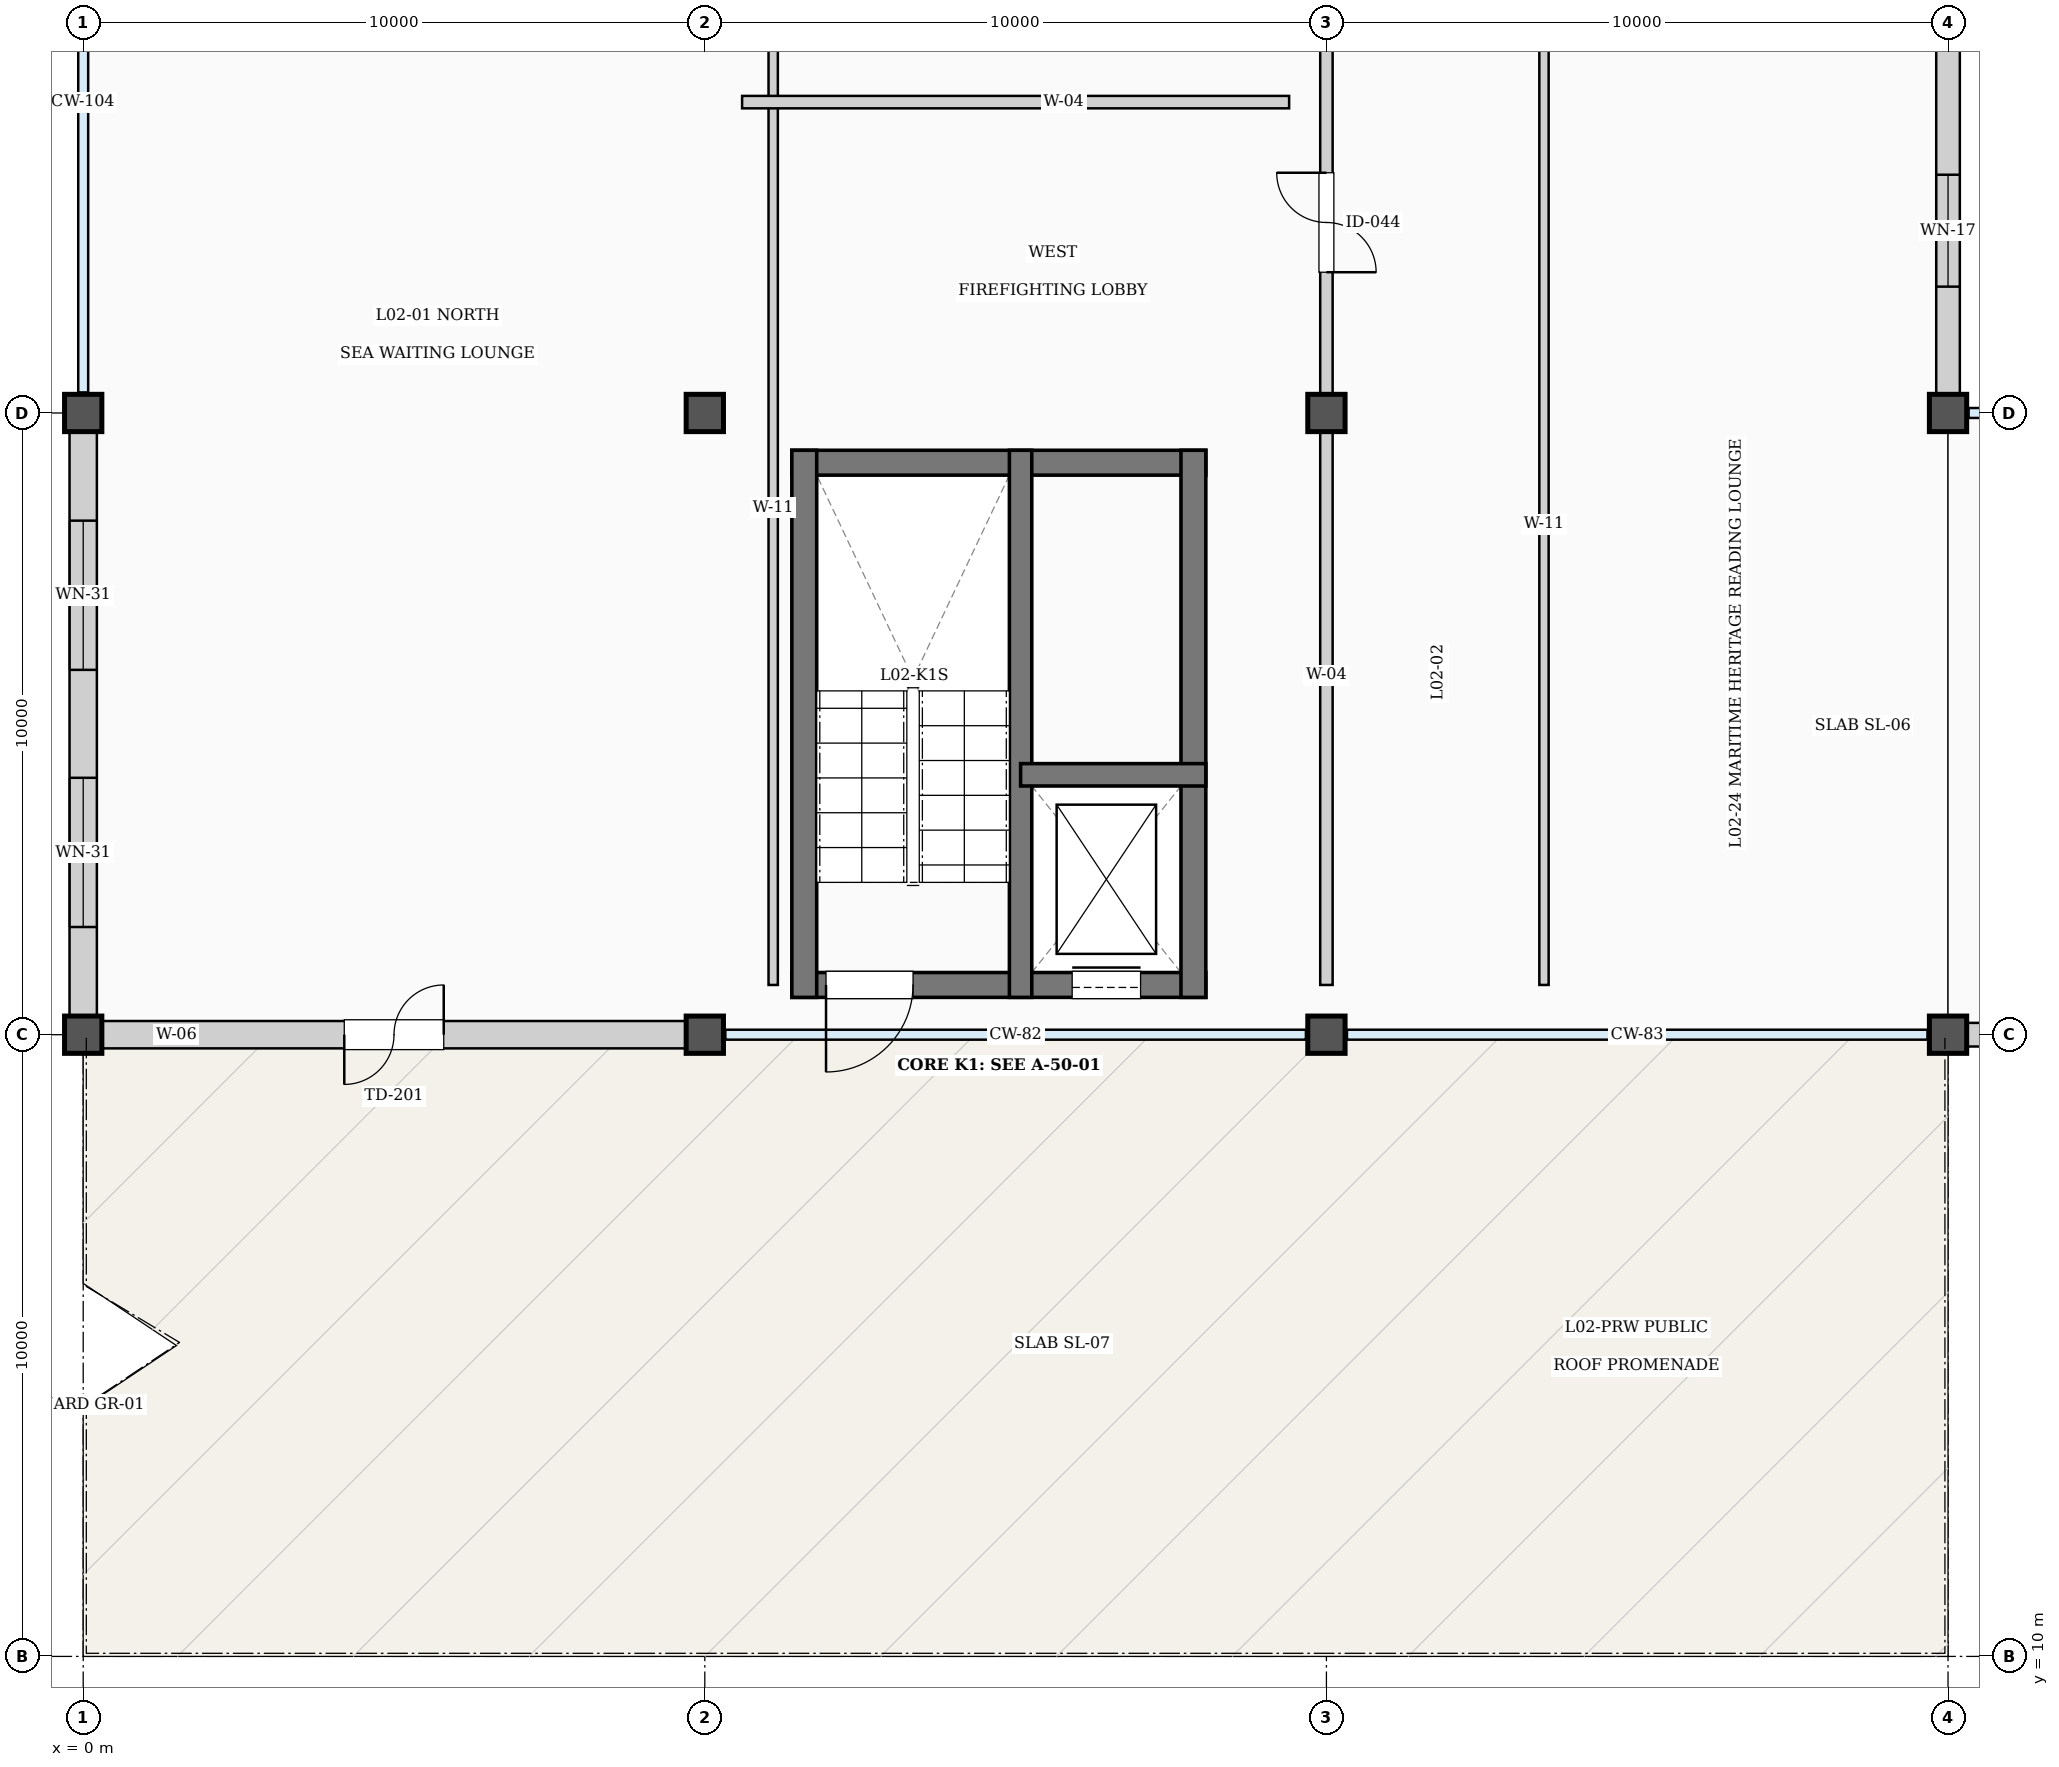
"""IFC4 building model, lengths in metres.
Left out: names, types, materials, properties, quantities, classifications, styles, units other than length and angle.
Written with IfcOpenShell. Run it as: python <this file> out.ifc"""

import sys

from ifc_helpers import new_model, si_unit, direction, frame, frame_2d, origin, origin_2d, place, context, subcontext, project, spatial, rectangle, extrude, element, fill, save


model = new_model("IFC4")
c1 = context("Model", 3, precision=1e-05, world=origin(), true_north=direction((0.0, 1.0)))
c2 = subcontext(c1, "Body", "Model", "MODEL_VIEW")
j1 = project(units=[si_unit("LENGTHUNIT", "METRE"), si_unit("PLANEANGLEUNIT", "RADIAN")], contexts=[c1])
p1 = place(None, origin())
s1 = spatial("IfcSite", under=j1, at=p1, CompositionType="ELEMENT")
p2 = place(p1, origin())
s2 = spatial("IfcBuilding", under=s1, at=p2, CompositionType="ELEMENT")
p3 = place(p2, frame((0.0, 0.0, 10.2)))
s3 = spatial("IfcBuildingStorey", under=s2, at=p3, CompositionType="ELEMENT", Elevation=10.2)
for number, where, z_axis, x_axis in (
    (1, (0.0, 20.0, 0.0), (0.0, 0.0, 1.0), (1.0, 0.0, 0.0)),
    (2, (0.0, 30.0, 0.0), (0.0, 0.0, 1.0), (1.0, 0.0, 0.0)),
    (3, (10.0, 20.0, 0.0), (0.0, 0.0, 1.0), (1.0, 0.0, 0.0)),
    (4, (10.0, 30.0, 0.0), (0.0, 0.0, 1.0), (1.0, 0.0, 0.0)),
    (5, (20.0, 20.0, 0.0), (0.0, 0.0, 1.0), (1.0, 0.0, 0.0)),
    (6, (20.0, 30.0, 0.0), (0.0, 0.0, 1.0), (1.0, 0.0, 0.0)),
    (7, (30.0, 20.0, 0.0), (0.0, 0.0, 1.0), (1.0, 0.0, 0.0)),
    (8, (30.0, 30.0, 0.0), (0.0, 0.0, 1.0), (1.0, 0.0, 0.0)),
):
    element("IfcColumn", number, at=place(p3, frame(where, z_axis=z_axis, x_axis=x_axis)), inside=s3, PredefinedType="COLUMN", context=c2, shape_type="SweptSolid", body=[
        extrude(rectangle(XDim=0.6, YDim=0.6, at=origin_2d()), origin(), (0.0, 0.0, 1.0), 4.2),
    ])
p4 = place(p3, frame((0.3, 20.0, 0.0), z_axis=(0.0, 0.0, 1.0), x_axis=(1.0, 0.0, 0.0)))
e9 = element("IfcWall", 9, at=p4, inside=s3, PredefinedType="SOLIDWALL", context=c2, shape_type="SweptSolid", body=[
    extrude(rectangle(XDim=9.4, YDim=0.44, at=frame_2d((4.7, 0.0))), origin(), (0.0, 0.0, 1.0), 3.62),
])
p5 = place(p4, frame((3.9, 0.0, 0.0)))
e10 = element("IfcOpeningElement", 10, at=p5, cuts=e9, PredefinedType="OPENING", context=c2, shape_type="SweptSolid", body=[
    extrude(rectangle(XDim=1.6, YDim=2.35, at=frame_2d((0.8, 1.175))), frame((0.0, 0.23, 0.0), z_axis=(0.0, -1.0, 0.0), x_axis=(1.0, 0.0, 0.0)), (0.0, 0.0, 1.0), 0.46),
])
p6 = place(p3, frame((30.3, 20.0, 0.0), z_axis=(0.0, 0.0, 1.0), x_axis=(1.0, 0.0, 0.0)))
e11 = element("IfcWall", 11, at=p6, inside=s3, PredefinedType="SOLIDWALL", context=c2, shape_type="SweptSolid", body=[
    extrude(rectangle(XDim=9.475, YDim=0.38, at=frame_2d((4.737, 0.0))), origin(), (0.0, 0.0, 1.0), 3.63),
])
p7 = place(p6, frame((1.753, 0.0, 0.9)))
e12 = element("IfcOpeningElement", 12, at=p7, cuts=e11, PredefinedType="OPENING", context=c2, shape_type="SweptSolid", body=[
    extrude(rectangle(XDim=1.8, YDim=2.1, at=frame_2d((0.9, 1.05))), frame((0.0, 0.2, 0.0), z_axis=(0.0, -1.0, 0.0), x_axis=(1.0, 0.0, 0.0)), (0.0, 0.0, 1.0), 0.4),
])
p8 = place(p6, frame((5.922, 0.0, 0.9)))
e13 = element("IfcOpeningElement", 13, at=p8, cuts=e11, PredefinedType="OPENING", context=c2, shape_type="SweptSolid", body=[
    extrude(rectangle(XDim=1.8, YDim=2.1, at=frame_2d((0.9, 1.05))), frame((0.0, 0.2, 0.0), z_axis=(0.0, -1.0, 0.0), x_axis=(1.0, 0.0, 0.0)), (0.0, 0.0, 1.0), 0.4),
])
p9 = place(p3, frame((0.0, 20.3, 0.0), z_axis=(0.0, 0.0, 1.0), x_axis=(0.0, 1.0, 0.0)))
e14 = element("IfcWall", 14, at=p9, inside=s3, PredefinedType="SOLIDWALL", context=c2, shape_type="SweptSolid", body=[
    extrude(rectangle(XDim=9.4, YDim=0.44, at=frame_2d((4.7, 0.0))), origin(), (0.0, 0.0, 1.0), 3.67),
])
p10 = place(p9, frame((1.432, 0.0, 0.9)))
e15 = element("IfcOpeningElement", 15, at=p10, cuts=e14, PredefinedType="OPENING", context=c2, shape_type="SweptSolid", body=[
    extrude(rectangle(XDim=2.4, YDim=2.1, at=frame_2d((1.2, 1.05))), frame((0.0, 0.23, 0.0), z_axis=(0.0, -1.0, 0.0), x_axis=(1.0, 0.0, 0.0)), (0.0, 0.0, 1.0), 0.46),
])
p11 = place(p9, frame((5.568, 0.0, 0.9)))
e16 = element("IfcOpeningElement", 16, at=p11, cuts=e14, PredefinedType="OPENING", context=c2, shape_type="SweptSolid", body=[
    extrude(rectangle(XDim=2.4, YDim=2.1, at=frame_2d((1.2, 1.05))), frame((0.0, 0.23, 0.0), z_axis=(0.0, -1.0, 0.0), x_axis=(1.0, 0.0, 0.0)), (0.0, 0.0, 1.0), 0.46),
])
p12 = place(p3, frame((30.0, 39.7, 0.0), z_axis=(0.0, 0.0, 1.0), x_axis=(0.0, -1.0, 0.0)))
e17 = element("IfcWall", 17, at=p12, inside=s3, PredefinedType="SOLIDWALL", context=c2, shape_type="SweptSolid", body=[
    extrude(rectangle(XDim=9.4, YDim=0.38, at=frame_2d((4.7, 0.0))), origin(), (0.0, 0.0, 1.0), 3.27),
])
p13 = place(p12, frame((1.732, 0.0, 0.9)))
e18 = element("IfcOpeningElement", 18, at=p13, cuts=e17, PredefinedType="OPENING", context=c2, shape_type="SweptSolid", body=[
    extrude(rectangle(XDim=1.8, YDim=1.5, at=frame_2d((0.9, 0.75))), frame((0.0, 0.2, 0.0), z_axis=(0.0, -1.0, 0.0), x_axis=(1.0, 0.0, 0.0)), (0.0, 0.0, 1.0), 0.4),
])
p14 = place(p12, frame((5.868, 0.0, 0.9)))
e19 = element("IfcOpeningElement", 19, at=p14, cuts=e17, PredefinedType="OPENING", context=c2, shape_type="SweptSolid", body=[
    extrude(rectangle(XDim=1.8, YDim=1.5, at=frame_2d((0.9, 0.75))), frame((0.0, 0.2, 0.0), z_axis=(0.0, -1.0, 0.0), x_axis=(1.0, 0.0, 0.0)), (0.0, 0.0, 1.0), 0.4),
])
p15 = place(p3, frame((11.4, 20.8, 0.0), z_axis=(0.0, 0.0, 1.0), x_axis=(1.0, 0.0, 0.0)))
e20 = element("IfcWall", 20, at=p15, inside=s3, PredefinedType="SHEAR", context=c2, shape_type="SweptSolid", body=[
    extrude(rectangle(XDim=6.66, YDim=0.4, at=frame_2d((3.33, 0.0))), origin(), (0.0, 0.0, 1.0), 4.2),
])
p16 = place(p15, frame((0.55, 0.0, 0.0)))
e21 = element("IfcOpeningElement", 21, at=p16, cuts=e20, PredefinedType="OPENING", context=c2, shape_type="SweptSolid", body=[
    extrude(rectangle(XDim=1.4, YDim=2.35, at=frame_2d((0.7, 1.175))), frame((0.0, 0.21, 0.0), z_axis=(0.0, -1.0, 0.0), x_axis=(1.0, 0.0, 0.0)), (0.0, 0.0, 1.0), 0.42),
])
p17 = place(p15, frame((4.51, 0.0, 0.0)))
e22 = element("IfcOpeningElement", 22, at=p17, cuts=e20, PredefinedType="OPENING", context=c2, shape_type="SweptSolid", body=[
    extrude(rectangle(XDim=1.1, YDim=2.3, at=frame_2d((0.55, 1.15))), frame((0.0, 0.21, 0.0), z_axis=(0.0, -1.0, 0.0), x_axis=(1.0, 0.0, 0.0)), (0.0, 0.0, 1.0), 0.42),
])
p18 = place(p3, frame((11.4, 29.2, 0.0), z_axis=(0.0, 0.0, 1.0), x_axis=(1.0, 0.0, 0.0)))
e23 = element("IfcWall", 23, at=p18, inside=s3, PredefinedType="SHEAR", context=c2, shape_type="SweptSolid", body=[
    extrude(rectangle(XDim=6.66, YDim=0.4, at=frame_2d((3.33, 0.0))), origin(), (0.0, 0.0, 1.0), 4.2),
])
for number, where, z_axis, x_axis in (
    (24, (11.6, 20.6, 0.0), (0.0, 0.0, 1.0), (0.0, 1.0, 0.0)),
    (25, (17.86, 20.6, 0.0), (0.0, 0.0, 1.0), (0.0, 1.0, 0.0)),
):
    element("IfcWall", number, at=place(p3, frame(where, z_axis=z_axis, x_axis=x_axis)), inside=s3, PredefinedType="SHEAR", context=c2, shape_type="SweptSolid", body=[
        extrude(rectangle(XDim=8.8, YDim=0.4, at=frame_2d((4.4, 0.0))), origin(), (0.0, 0.0, 1.0), 4.2),
    ])
p19 = place(p3, frame((15.08, 20.6, 0.0), z_axis=(0.0, 0.0, 1.0), x_axis=(0.0, 1.0, 0.0)))
e26 = element("IfcWall", 26, at=p19, inside=s3, PredefinedType="SHEAR", context=c2, shape_type="SweptSolid", body=[
    extrude(rectangle(XDim=8.8, YDim=0.36, at=frame_2d((4.4, 0.0))), origin(), (0.0, 0.0, 1.0), 4.2),
])
p20 = place(p3, frame((15.08, 24.18, 0.0), z_axis=(0.0, 0.0, 1.0), x_axis=(1.0, 0.0, 0.0)))
e27 = element("IfcWall", 27, at=p20, inside=s3, PredefinedType="SHEAR", context=c2, shape_type="SweptSolid", body=[
    extrude(rectangle(XDim=2.98, YDim=0.36, at=frame_2d((1.49, 0.0))), origin(), (0.0, 0.0, 1.0), 4.2),
])
p21 = place(p3, frame((20.0, 20.8, 0.0), z_axis=(0.0, 0.0, 1.0), x_axis=(0.0, 1.0, 0.0)))
e28 = element("IfcWall", 28, at=p21, inside=s3, PredefinedType="PARTITIONING", context=c2, shape_type="SweptSolid", body=[
    extrude(rectangle(XDim=58.4, YDim=0.2, at=frame_2d((29.2, 0.0))), origin(), (0.0, 0.0, 1.0), 3.63),
])
p22 = place(p21, frame((11.464, 0.0, 0.0)))
e29 = element("IfcOpeningElement", 29, at=p22, cuts=e28, PredefinedType="OPENING", context=c2, shape_type="SweptSolid", body=[
    extrude(rectangle(XDim=1.6, YDim=2.4, at=frame_2d((0.8, 1.2))), frame((0.0, 0.11, 0.0), z_axis=(0.0, -1.0, 0.0), x_axis=(1.0, 0.0, 0.0)), (0.0, 0.0, 1.0), 0.22),
])
p23 = place(p21, frame((23.778, 0.0, 0.0)))
e30 = element("IfcOpeningElement", 30, at=p23, cuts=e28, PredefinedType="OPENING", context=c2, shape_type="SweptSolid", body=[
    extrude(rectangle(XDim=1.5, YDim=2.5, at=frame_2d((0.75, 1.25))), frame((0.0, 0.11, 0.0), z_axis=(0.0, -1.0, 0.0), x_axis=(1.0, 0.0, 0.0)), (0.0, 0.0, 1.0), 0.22),
])
p24 = place(p21, frame((43.25, 0.0, 0.0)))
e31 = element("IfcOpeningElement", 31, at=p24, cuts=e28, PredefinedType="OPENING", context=c2, shape_type="SweptSolid", body=[
    extrude(rectangle(XDim=1.1, YDim=2.3, at=frame_2d((0.55, 1.15))), frame((0.0, 0.11, 0.0), z_axis=(0.0, -1.0, 0.0), x_axis=(1.0, 0.0, 0.0)), (0.0, 0.0, 1.0), 0.22),
])
p25 = place(p3, frame((23.5, 20.8, 0.0), z_axis=(0.0, 0.0, 1.0), x_axis=(0.0, 1.0, 0.0)))
e32 = element("IfcWall", 32, at=p25, inside=s3, PredefinedType="PARTITIONING", context=c2, shape_type="SweptSolid", body=[
    extrude(rectangle(XDim=58.4, YDim=0.15, at=frame_2d((29.2, 0.0))), origin(), (0.0, 0.0, 1.0), 3.86),
])
p26 = place(p25, frame((16.52, 0.0, 0.0)))
e33 = element("IfcOpeningElement", 33, at=p26, cuts=e32, PredefinedType="OPENING", context=c2, shape_type="SweptSolid", body=[
    extrude(rectangle(XDim=2.0, YDim=2.45, at=frame_2d((1.0, 1.225))), frame((0.0, 0.085, 0.0), z_axis=(0.0, -1.0, 0.0), x_axis=(1.0, 0.0, 0.0)), (0.0, 0.0, 1.0), 0.17),
])
p27 = place(p25, frame((45.72, 0.0, 0.0)))
e34 = element("IfcOpeningElement", 34, at=p27, cuts=e32, PredefinedType="OPENING", context=c2, shape_type="SweptSolid", body=[
    extrude(rectangle(XDim=2.0, YDim=2.45, at=frame_2d((1.0, 1.225))), frame((0.0, 0.085, 0.0), z_axis=(0.0, -1.0, 0.0), x_axis=(1.0, 0.0, 0.0)), (0.0, 0.0, 1.0), 0.17),
])
p28 = place(p3, frame((11.1, 20.8, 0.0), z_axis=(0.0, 0.0, 1.0), x_axis=(0.0, 1.0, 0.0)))
e35 = element("IfcWall", 35, at=p28, inside=s3, PredefinedType="PARTITIONING", context=c2, shape_type="SweptSolid", body=[
    extrude(rectangle(XDim=38.4, YDim=0.15, at=frame_2d((19.2, 0.0))), origin(), (0.0, 0.0, 1.0), 3.86),
])
p29 = place(p28, frame((15.128, 0.0, 0.0)))
e36 = element("IfcOpeningElement", 36, at=p29, cuts=e35, PredefinedType="OPENING", context=c2, shape_type="SweptSolid", body=[
    extrude(rectangle(XDim=2.0, YDim=2.45, at=frame_2d((1.0, 1.225))), frame((0.0, 0.085, 0.0), z_axis=(0.0, -1.0, 0.0), x_axis=(1.0, 0.0, 0.0)), (0.0, 0.0, 1.0), 0.17),
])
p30 = place(p3, frame((10.6, 35.0, 0.0), z_axis=(0.0, 0.0, 1.0), x_axis=(1.0, 0.0, 0.0)))
e37 = element("IfcWall", 37, at=p30, inside=s3, PredefinedType="PARTITIONING", context=c2, shape_type="SweptSolid", body=[
    extrude(rectangle(XDim=8.8, YDim=0.2, at=frame_2d((4.4, 0.0))), origin(), (0.0, 0.0, 1.0), 3.86),
])
p31 = place(p5, origin())
e38 = element("IfcDoor", 38, at=p31, inside=s3, OperationType="DOUBLE_DOOR_SINGLE_SWING", PredefinedType="DOOR", context=c2, shape_type="SweptSolid", body=[
    extrude(rectangle(XDim=1.6, YDim=2.35, at=frame_2d((0.8, 1.175))), frame((0.0, 0.025, 0.0), z_axis=(0.0, -1.0, 0.0), x_axis=(1.0, 0.0, 0.0)), (0.0, 0.0, 1.0), 0.05),
])
fill(e10, e38)
p32 = place(p10, origin())
e39 = element("IfcWindow", 39, at=p32, inside=s3, PartitioningType="SINGLE_PANEL", PredefinedType="WINDOW", context=c2, shape_type="SweptSolid", body=[
    extrude(rectangle(XDim=2.4, YDim=2.1, at=frame_2d((1.2, 1.05))), frame((0.0, 0.03, 0.0), z_axis=(0.0, -1.0, 0.0), x_axis=(1.0, 0.0, 0.0)), (0.0, 0.0, 1.0), 0.06),
])
fill(e15, e39)
p33 = place(p11, origin())
e40 = element("IfcWindow", 40, at=p33, inside=s3, PartitioningType="SINGLE_PANEL", PredefinedType="WINDOW", context=c2, shape_type="SweptSolid", body=[
    extrude(rectangle(XDim=2.4, YDim=2.1, at=frame_2d((1.2, 1.05))), frame((0.0, 0.03, 0.0), z_axis=(0.0, -1.0, 0.0), x_axis=(1.0, 0.0, 0.0)), (0.0, 0.0, 1.0), 0.06),
])
fill(e16, e40)
p34 = place(p14, origin())
e41 = element("IfcWindow", 41, at=p34, inside=s3, PartitioningType="SINGLE_PANEL", PredefinedType="WINDOW", context=c2, shape_type="SweptSolid", body=[
    extrude(rectangle(XDim=1.8, YDim=1.5, at=frame_2d((0.9, 0.75))), frame((0.0, 0.03, 0.0), z_axis=(0.0, -1.0, 0.0), x_axis=(1.0, 0.0, 0.0)), (0.0, 0.0, 1.0), 0.06),
])
fill(e19, e41)
p35 = place(p16, origin())
e42 = element("IfcDoor", 42, at=p35, inside=s3, OperationType="SINGLE_SWING_LEFT", PredefinedType="DOOR", context=c2, shape_type="SweptSolid", body=[
    extrude(rectangle(XDim=1.4, YDim=2.35, at=frame_2d((0.7, 1.175))), frame((0.0, 0.025, 0.0), z_axis=(0.0, -1.0, 0.0), x_axis=(1.0, 0.0, 0.0)), (0.0, 0.0, 1.0), 0.05),
])
fill(e21, e42)
p36 = place(p17, origin())
e43 = element("IfcDoor", 43, at=p36, inside=s3, OperationType="SLIDING_TO_LEFT", PredefinedType="DOOR", context=c2, shape_type="SweptSolid", body=[
    extrude(rectangle(XDim=1.1, YDim=2.3, at=frame_2d((0.55, 1.15))), frame((0.0, 0.025, 0.0), z_axis=(0.0, -1.0, 0.0), x_axis=(1.0, 0.0, 0.0)), (0.0, 0.0, 1.0), 0.05),
])
fill(e22, e43)
p37 = place(p22, origin())
e44 = element("IfcDoor", 44, at=p37, inside=s3, OperationType="DOUBLE_DOOR_SINGLE_SWING", PredefinedType="DOOR", context=c2, shape_type="SweptSolid", body=[
    extrude(rectangle(XDim=1.6, YDim=2.4, at=frame_2d((0.8, 1.2))), frame((0.0, 0.025, 0.0), z_axis=(0.0, -1.0, 0.0), x_axis=(1.0, 0.0, 0.0)), (0.0, 0.0, 1.0), 0.05),
])
fill(e29, e44)
save(model, sys.argv[1])
